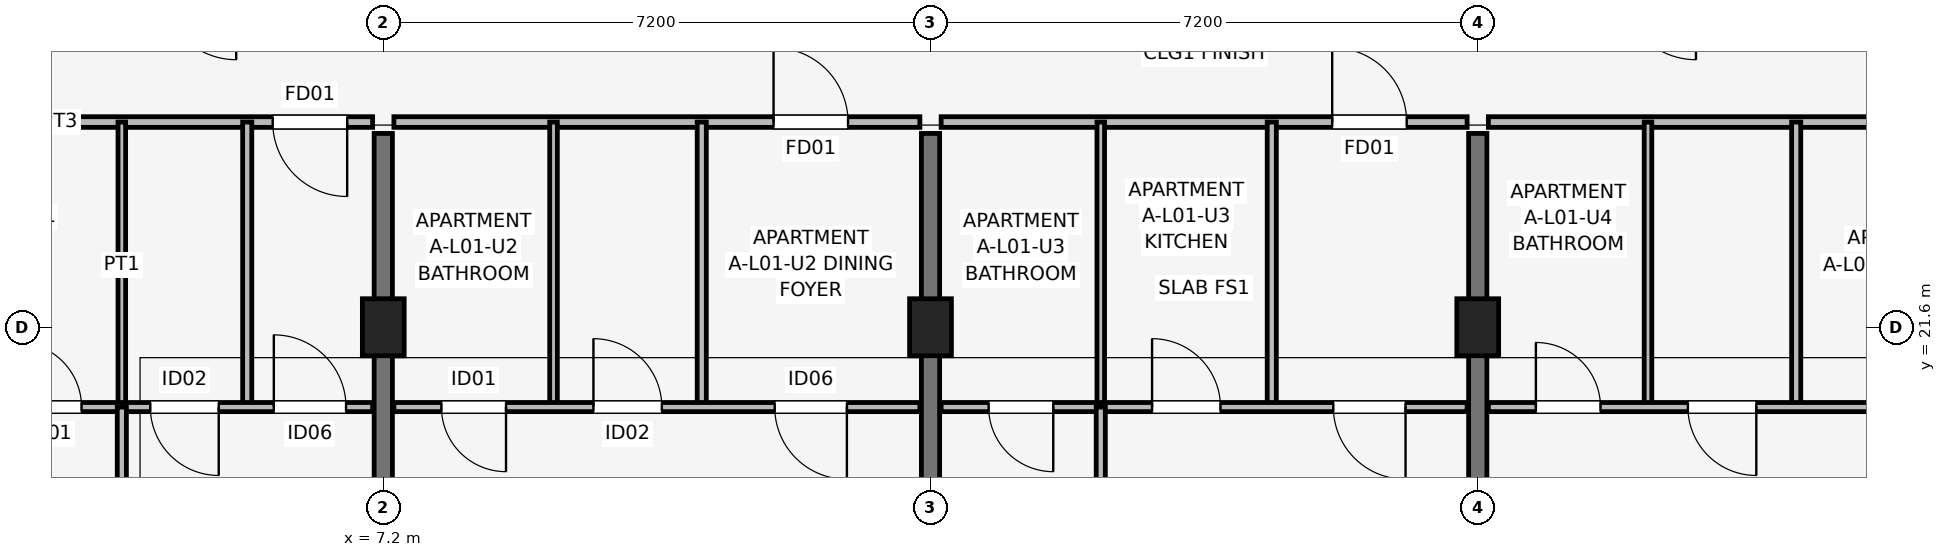
"""IFC4 building model, lengths in metres.
Left out: names, types, materials, properties, quantities, classifications, styles, units other than length and angle.
Written with IfcOpenShell. Run it as: python <this file> out.ifc"""

import sys

from ifc_helpers import new_model, si_unit, direction, frame, frame_2d, origin, origin_2d, place, context, subcontext, project, spatial, rectangle, extrude, element, fill, save


model = new_model("IFC4")
c1 = context("Model", 3, precision=1e-05, world=origin(), true_north=direction((0.0, 1.0)))
c2 = subcontext(c1, "Body", "Model", "MODEL_VIEW")
j1 = project(units=[si_unit("LENGTHUNIT", "METRE"), si_unit("PLANEANGLEUNIT", "RADIAN")], contexts=[c1])
p1 = place(None, origin())
s1 = spatial("IfcSite", under=j1, at=p1, CompositionType="ELEMENT")
p2 = place(p1, origin())
s2 = spatial("IfcBuilding", under=s1, at=p2, CompositionType="ELEMENT")
p3 = place(p2, frame((0.0, 0.0, 4.5)))
s3 = spatial("IfcBuildingStorey", under=s2, at=p3, CompositionType="ELEMENT", Elevation=4.5)
for number, where, z_axis, x_axis in (
    (1, (7.2, 21.6, 0.0), (0.0, 0.0, 1.0), (1.0, 0.0, 0.0)),
    (2, (14.4, 21.6, 0.0), (0.0, 0.0, 1.0), (1.0, 0.0, 0.0)),
    (3, (21.6, 21.6, 0.0), (0.0, 0.0, 1.0), (1.0, 0.0, 0.0)),
):
    element("IfcColumn", number, at=place(p3, frame(where, z_axis=z_axis, x_axis=x_axis)), inside=s3, PredefinedType="COLUMN", context=c2, shape_type="SweptSolid", body=[
        extrude(rectangle(XDim=0.55, YDim=0.75, at=origin_2d()), origin(), (0.0, 0.0, 1.0), 4.2),
    ])
for number, where, z_axis, x_axis in (
    (4, (7.2, 14.75, 0.0), (0.0, 0.0, 1.0), (0.0, 1.0, 0.0)),
    (5, (14.4, 14.75, 0.0), (0.0, 0.0, 1.0), (0.0, 1.0, 0.0)),
    (6, (21.6, 14.75, 0.0), (0.0, 0.0, 1.0), (0.0, 1.0, 0.0)),
):
    element("IfcWall", number, at=place(p3, frame(where, z_axis=z_axis, x_axis=x_axis)), inside=s3, PredefinedType="SHEAR", context=c2, shape_type="SweptSolid", body=[
        extrude(rectangle(XDim=9.4, YDim=0.24, at=frame_2d((4.7, 0.0))), origin(), (0.0, 0.0, 1.0), 4.2),
    ])
p4 = place(p3, frame((0.14, 24.3, 0.0), z_axis=(0.0, 0.0, 1.0), x_axis=(1.0, 0.0, 0.0)))
e7 = element("IfcWall", 7, at=p4, inside=s3, PredefinedType="PARTITIONING", context=c2, shape_type="SweptSolid", body=[
    extrude(rectangle(XDim=6.92, YDim=0.14, at=frame_2d((3.46, 0.0))), origin(), (0.0, 0.0, 1.0), 3.25),
])
p5 = place(p4, frame((6.585, 0.0, 0.0), z_axis=(0.0, 0.0, 1.0), x_axis=(-1.0, 0.0, 0.0)))
e8 = element("IfcOpeningElement", 8, at=p5, cuts=e7, PredefinedType="OPENING", context=c2, shape_type="SweptSolid", body=[
    extrude(rectangle(XDim=0.98, YDim=2.1, at=frame_2d((0.49, 1.05))), frame((0.0, 0.08, 0.0), z_axis=(0.0, -1.0, 0.0), x_axis=(1.0, 0.0, 0.0)), (0.0, 0.0, 1.0), 0.16),
])
p6 = place(p3, frame((3.76, 20.55, 0.0), z_axis=(0.0, 0.0, 1.0), x_axis=(0.0, 1.0, 0.0)))
e9 = element("IfcWall", 9, at=p6, inside=s3, PredefinedType="PARTITIONING", context=c2, shape_type="SweptSolid", body=[
    extrude(rectangle(XDim=3.75, YDim=0.1, at=frame_2d((1.875, 0.0))), origin(), (0.0, 0.0, 1.0), 3.25),
])
p7 = place(p3, frame((5.41, 20.55, 0.0), z_axis=(0.0, 0.0, 1.0), x_axis=(0.0, 1.0, 0.0)))
e10 = element("IfcWall", 10, at=p7, inside=s3, PredefinedType="PARTITIONING", context=c2, shape_type="SweptSolid", body=[
    extrude(rectangle(XDim=3.75, YDim=0.12, at=frame_2d((1.875, 0.0))), origin(), (0.0, 0.0, 1.0), 3.25),
])
p8 = place(p3, frame((0.14, 20.55, 0.0), z_axis=(0.0, 0.0, 1.0), x_axis=(1.0, 0.0, 0.0)))
e11 = element("IfcWall", 11, at=p8, inside=s3, PredefinedType="PARTITIONING", context=c2, shape_type="SweptSolid", body=[
    extrude(rectangle(XDim=6.92, YDim=0.12, at=frame_2d((3.46, 0.0))), origin(), (0.0, 0.0, 1.0), 3.25),
])
p9 = place(p8, frame((2.24, 0.0, 0.0)))
e12 = element("IfcOpeningElement", 12, at=p9, cuts=e11, PredefinedType="OPENING", context=c2, shape_type="SweptSolid", body=[
    extrude(rectangle(XDim=0.85, YDim=2.08, at=frame_2d((0.425, 1.04))), frame((0.0, 0.07, 0.0), z_axis=(0.0, -1.0, 0.0), x_axis=(1.0, 0.0, 0.0)), (0.0, 0.0, 1.0), 0.14),
])
p10 = place(p8, frame((4.895, 0.0, 0.0), z_axis=(0.0, 0.0, 1.0), x_axis=(-1.0, 0.0, 0.0)))
e13 = element("IfcOpeningElement", 13, at=p10, cuts=e11, PredefinedType="OPENING", context=c2, shape_type="SweptSolid", body=[
    extrude(rectangle(XDim=0.9, YDim=2.08, at=frame_2d((0.45, 1.04))), frame((0.0, 0.07, 0.0), z_axis=(0.0, -1.0, 0.0), x_axis=(1.0, 0.0, 0.0)), (0.0, 0.0, 1.0), 0.14),
])
p11 = place(p8, frame((5.62, 0.0, 0.0)))
e14 = element("IfcOpeningElement", 14, at=p11, cuts=e11, PredefinedType="OPENING", context=c2, shape_type="SweptSolid", body=[
    extrude(rectangle(XDim=0.95, YDim=2.08, at=frame_2d((0.475, 1.04))), frame((0.0, 0.07, 0.0), z_axis=(0.0, -1.0, 0.0), x_axis=(1.0, 0.0, 0.0)), (0.0, 0.0, 1.0), 0.14),
])
p12 = place(p3, frame((3.76, 14.7, 0.0), z_axis=(0.0, 0.0, 1.0), x_axis=(0.0, 1.0, 0.0)))
e15 = element("IfcWall", 15, at=p12, inside=s3, PredefinedType="PARTITIONING", context=c2, shape_type="SweptSolid", body=[
    extrude(rectangle(XDim=5.85, YDim=0.12, at=frame_2d((2.925, 0.0))), origin(), (0.0, 0.0, 1.0), 3.25),
])
p13 = place(p12, frame((3.375, 0.0, 0.0), z_axis=(0.0, 0.0, 1.0), x_axis=(-1.0, 0.0, 0.0)))
e16 = element("IfcOpeningElement", 16, at=p13, cuts=e15, PredefinedType="OPENING", context=c2, shape_type="SweptSolid", body=[
    extrude(rectangle(XDim=0.9, YDim=2.08, at=frame_2d((0.45, 1.04))), frame((0.0, 0.07, 0.0), z_axis=(0.0, -1.0, 0.0), x_axis=(1.0, 0.0, 0.0)), (0.0, 0.0, 1.0), 0.14),
])
p14 = place(p3, frame((7.34, 24.3, 0.0), z_axis=(0.0, 0.0, 1.0), x_axis=(1.0, 0.0, 0.0)))
e17 = element("IfcWall", 17, at=p14, inside=s3, PredefinedType="PARTITIONING", context=c2, shape_type="SweptSolid", body=[
    extrude(rectangle(XDim=6.92, YDim=0.14, at=frame_2d((3.46, 0.0))), origin(), (0.0, 0.0, 1.0), 3.25),
])
p15 = place(p14, frame((4.995, 0.0, 0.0)))
e18 = element("IfcOpeningElement", 18, at=p15, cuts=e17, PredefinedType="OPENING", context=c2, shape_type="SweptSolid", body=[
    extrude(rectangle(XDim=0.98, YDim=2.1, at=frame_2d((0.49, 1.05))), frame((0.0, 0.08, 0.0), z_axis=(0.0, -1.0, 0.0), x_axis=(1.0, 0.0, 0.0)), (0.0, 0.0, 1.0), 0.16),
])
p16 = place(p3, frame((9.44, 20.55, 0.0), z_axis=(0.0, 0.0, 1.0), x_axis=(0.0, 1.0, 0.0)))
e19 = element("IfcWall", 19, at=p16, inside=s3, PredefinedType="PARTITIONING", context=c2, shape_type="SweptSolid", body=[
    extrude(rectangle(XDim=3.75, YDim=0.1, at=frame_2d((1.875, 0.0))), origin(), (0.0, 0.0, 1.0), 3.25),
])
p17 = place(p3, frame((11.39, 20.55, 0.0), z_axis=(0.0, 0.0, 1.0), x_axis=(0.0, 1.0, 0.0)))
e20 = element("IfcWall", 20, at=p17, inside=s3, PredefinedType="PARTITIONING", context=c2, shape_type="SweptSolid", body=[
    extrude(rectangle(XDim=3.75, YDim=0.12, at=frame_2d((1.875, 0.0))), origin(), (0.0, 0.0, 1.0), 3.25),
])
p18 = place(p3, frame((7.34, 20.55, 0.0), z_axis=(0.0, 0.0, 1.0), x_axis=(1.0, 0.0, 0.0)))
e21 = element("IfcWall", 21, at=p18, inside=s3, PredefinedType="PARTITIONING", context=c2, shape_type="SweptSolid", body=[
    extrude(rectangle(XDim=6.92, YDim=0.12, at=frame_2d((3.46, 0.0))), origin(), (0.0, 0.0, 1.0), 3.25),
])
p19 = place(p18, frame((1.475, 0.0, 0.0), z_axis=(0.0, 0.0, 1.0), x_axis=(-1.0, 0.0, 0.0)))
e22 = element("IfcOpeningElement", 22, at=p19, cuts=e21, PredefinedType="OPENING", context=c2, shape_type="SweptSolid", body=[
    extrude(rectangle(XDim=0.85, YDim=2.08, at=frame_2d((0.425, 1.04))), frame((0.0, 0.07, 0.0), z_axis=(0.0, -1.0, 0.0), x_axis=(1.0, 0.0, 0.0)), (0.0, 0.0, 1.0), 0.14),
])
p20 = place(p18, frame((2.625, 0.0, 0.0)))
e23 = element("IfcOpeningElement", 23, at=p20, cuts=e21, PredefinedType="OPENING", context=c2, shape_type="SweptSolid", body=[
    extrude(rectangle(XDim=0.9, YDim=2.08, at=frame_2d((0.45, 1.04))), frame((0.0, 0.07, 0.0), z_axis=(0.0, -1.0, 0.0), x_axis=(1.0, 0.0, 0.0)), (0.0, 0.0, 1.0), 0.14),
])
p21 = place(p18, frame((5.96, 0.0, 0.0), z_axis=(0.0, 0.0, 1.0), x_axis=(-1.0, 0.0, 0.0)))
e24 = element("IfcOpeningElement", 24, at=p21, cuts=e21, PredefinedType="OPENING", context=c2, shape_type="SweptSolid", body=[
    extrude(rectangle(XDim=0.95, YDim=2.08, at=frame_2d((0.475, 1.04))), frame((0.0, 0.07, 0.0), z_axis=(0.0, -1.0, 0.0), x_axis=(1.0, 0.0, 0.0)), (0.0, 0.0, 1.0), 0.14),
])
p22 = place(p3, frame((14.54, 24.3, 0.0), z_axis=(0.0, 0.0, 1.0), x_axis=(1.0, 0.0, 0.0)))
e25 = element("IfcWall", 25, at=p22, inside=s3, PredefinedType="PARTITIONING", context=c2, shape_type="SweptSolid", body=[
    extrude(rectangle(XDim=6.92, YDim=0.14, at=frame_2d((3.46, 0.0))), origin(), (0.0, 0.0, 1.0), 3.25),
])
p23 = place(p22, frame((5.145, 0.0, 0.0)))
e26 = element("IfcOpeningElement", 26, at=p23, cuts=e25, PredefinedType="OPENING", context=c2, shape_type="SweptSolid", body=[
    extrude(rectangle(XDim=0.98, YDim=2.1, at=frame_2d((0.49, 1.05))), frame((0.0, 0.08, 0.0), z_axis=(0.0, -1.0, 0.0), x_axis=(1.0, 0.0, 0.0)), (0.0, 0.0, 1.0), 0.16),
])
p24 = place(p3, frame((16.64, 20.55, 0.0), z_axis=(0.0, 0.0, 1.0), x_axis=(0.0, 1.0, 0.0)))
e27 = element("IfcWall", 27, at=p24, inside=s3, PredefinedType="PARTITIONING", context=c2, shape_type="SweptSolid", body=[
    extrude(rectangle(XDim=3.75, YDim=0.1, at=frame_2d((1.875, 0.0))), origin(), (0.0, 0.0, 1.0), 3.25),
])
p25 = place(p3, frame((18.89, 20.55, 0.0), z_axis=(0.0, 0.0, 1.0), x_axis=(0.0, 1.0, 0.0)))
e28 = element("IfcWall", 28, at=p25, inside=s3, PredefinedType="PARTITIONING", context=c2, shape_type="SweptSolid", body=[
    extrude(rectangle(XDim=3.75, YDim=0.12, at=frame_2d((1.875, 0.0))), origin(), (0.0, 0.0, 1.0), 3.25),
])
p26 = place(p3, frame((14.54, 20.55, 0.0), z_axis=(0.0, 0.0, 1.0), x_axis=(1.0, 0.0, 0.0)))
e29 = element("IfcWall", 29, at=p26, inside=s3, PredefinedType="PARTITIONING", context=c2, shape_type="SweptSolid", body=[
    extrude(rectangle(XDim=6.92, YDim=0.12, at=frame_2d((3.46, 0.0))), origin(), (0.0, 0.0, 1.0), 3.25),
])
p27 = place(p26, frame((1.475, 0.0, 0.0), z_axis=(0.0, 0.0, 1.0), x_axis=(-1.0, 0.0, 0.0)))
e30 = element("IfcOpeningElement", 30, at=p27, cuts=e29, PredefinedType="OPENING", context=c2, shape_type="SweptSolid", body=[
    extrude(rectangle(XDim=0.85, YDim=2.08, at=frame_2d((0.425, 1.04))), frame((0.0, 0.07, 0.0), z_axis=(0.0, -1.0, 0.0), x_axis=(1.0, 0.0, 0.0)), (0.0, 0.0, 1.0), 0.14),
])
p28 = place(p26, frame((2.775, 0.0, 0.0)))
e31 = element("IfcOpeningElement", 31, at=p28, cuts=e29, PredefinedType="OPENING", context=c2, shape_type="SweptSolid", body=[
    extrude(rectangle(XDim=0.9, YDim=2.08, at=frame_2d((0.45, 1.04))), frame((0.0, 0.07, 0.0), z_axis=(0.0, -1.0, 0.0), x_axis=(1.0, 0.0, 0.0)), (0.0, 0.0, 1.0), 0.14),
])
p29 = place(p26, frame((6.11, 0.0, 0.0), z_axis=(0.0, 0.0, 1.0), x_axis=(-1.0, 0.0, 0.0)))
e32 = element("IfcOpeningElement", 32, at=p29, cuts=e29, PredefinedType="OPENING", context=c2, shape_type="SweptSolid", body=[
    extrude(rectangle(XDim=0.95, YDim=2.08, at=frame_2d((0.475, 1.04))), frame((0.0, 0.07, 0.0), z_axis=(0.0, -1.0, 0.0), x_axis=(1.0, 0.0, 0.0)), (0.0, 0.0, 1.0), 0.14),
])
p30 = place(p3, frame((16.64, 14.7, 0.0), z_axis=(0.0, 0.0, 1.0), x_axis=(0.0, 1.0, 0.0)))
e33 = element("IfcWall", 33, at=p30, inside=s3, PredefinedType="PARTITIONING", context=c2, shape_type="SweptSolid", body=[
    extrude(rectangle(XDim=5.85, YDim=0.12, at=frame_2d((2.925, 0.0))), origin(), (0.0, 0.0, 1.0), 3.25),
])
p31 = place(p30, frame((2.475, 0.0, 0.0)))
e34 = element("IfcOpeningElement", 34, at=p31, cuts=e33, PredefinedType="OPENING", context=c2, shape_type="SweptSolid", body=[
    extrude(rectangle(XDim=0.9, YDim=2.08, at=frame_2d((0.45, 1.04))), frame((0.0, 0.07, 0.0), z_axis=(0.0, -1.0, 0.0), x_axis=(1.0, 0.0, 0.0)), (0.0, 0.0, 1.0), 0.14),
])
p32 = place(p3, frame((21.74, 24.3, 0.0), z_axis=(0.0, 0.0, 1.0), x_axis=(1.0, 0.0, 0.0)))
e35 = element("IfcWall", 35, at=p32, inside=s3, PredefinedType="PARTITIONING", context=c2, shape_type="SweptSolid", body=[
    extrude(rectangle(XDim=6.92, YDim=0.14, at=frame_2d((3.46, 0.0))), origin(), (0.0, 0.0, 1.0), 3.25),
])
p33 = place(p32, frame((5.975, 0.0, 0.0), z_axis=(0.0, 0.0, 1.0), x_axis=(-1.0, 0.0, 0.0)))
e36 = element("IfcOpeningElement", 36, at=p33, cuts=e35, PredefinedType="OPENING", context=c2, shape_type="SweptSolid", body=[
    extrude(rectangle(XDim=0.98, YDim=2.1, at=frame_2d((0.49, 1.05))), frame((0.0, 0.08, 0.0), z_axis=(0.0, -1.0, 0.0), x_axis=(1.0, 0.0, 0.0)), (0.0, 0.0, 1.0), 0.16),
])
p34 = place(p3, frame((23.84, 20.55, 0.0), z_axis=(0.0, 0.0, 1.0), x_axis=(0.0, 1.0, 0.0)))
e37 = element("IfcWall", 37, at=p34, inside=s3, PredefinedType="PARTITIONING", context=c2, shape_type="SweptSolid", body=[
    extrude(rectangle(XDim=3.75, YDim=0.1, at=frame_2d((1.875, 0.0))), origin(), (0.0, 0.0, 1.0), 3.25),
])
p35 = place(p3, frame((25.79, 20.55, 0.0), z_axis=(0.0, 0.0, 1.0), x_axis=(0.0, 1.0, 0.0)))
e38 = element("IfcWall", 38, at=p35, inside=s3, PredefinedType="PARTITIONING", context=c2, shape_type="SweptSolid", body=[
    extrude(rectangle(XDim=3.75, YDim=0.12, at=frame_2d((1.875, 0.0))), origin(), (0.0, 0.0, 1.0), 3.25),
])
p36 = place(p3, frame((21.74, 20.55, 0.0), z_axis=(0.0, 0.0, 1.0), x_axis=(1.0, 0.0, 0.0)))
e39 = element("IfcWall", 39, at=p36, inside=s3, PredefinedType="PARTITIONING", context=c2, shape_type="SweptSolid", body=[
    extrude(rectangle(XDim=6.92, YDim=0.12, at=frame_2d((3.46, 0.0))), origin(), (0.0, 0.0, 1.0), 3.25),
])
p37 = place(p36, frame((0.625, 0.0, 0.0)))
e40 = element("IfcOpeningElement", 40, at=p37, cuts=e39, PredefinedType="OPENING", context=c2, shape_type="SweptSolid", body=[
    extrude(rectangle(XDim=0.85, YDim=2.08, at=frame_2d((0.425, 1.04))), frame((0.0, 0.07, 0.0), z_axis=(0.0, -1.0, 0.0), x_axis=(1.0, 0.0, 0.0)), (0.0, 0.0, 1.0), 0.14),
])
p38 = place(p36, frame((3.525, 0.0, 0.0), z_axis=(0.0, 0.0, 1.0), x_axis=(-1.0, 0.0, 0.0)))
e41 = element("IfcOpeningElement", 41, at=p38, cuts=e39, PredefinedType="OPENING", context=c2, shape_type="SweptSolid", body=[
    extrude(rectangle(XDim=0.9, YDim=2.08, at=frame_2d((0.45, 1.04))), frame((0.0, 0.07, 0.0), z_axis=(0.0, -1.0, 0.0), x_axis=(1.0, 0.0, 0.0)), (0.0, 0.0, 1.0), 0.14),
])
p39 = place(p36, frame((5.01, 0.0, 0.0)))
e42 = element("IfcOpeningElement", 42, at=p39, cuts=e39, PredefinedType="OPENING", context=c2, shape_type="SweptSolid", body=[
    extrude(rectangle(XDim=0.95, YDim=2.08, at=frame_2d((0.475, 1.04))), frame((0.0, 0.07, 0.0), z_axis=(0.0, -1.0, 0.0), x_axis=(1.0, 0.0, 0.0)), (0.0, 0.0, 1.0), 0.14),
])
p40 = place(p5, origin())
e43 = element("IfcDoor", 43, at=p40, inside=s3, OperationType="SINGLE_SWING_RIGHT", PredefinedType="DOOR", context=c2, shape_type="SweptSolid", body=[
    extrude(rectangle(XDim=0.98, YDim=2.1, at=frame_2d((0.49, 1.05))), frame((0.0, 0.025, 0.0), z_axis=(0.0, -1.0, 0.0), x_axis=(1.0, 0.0, 0.0)), (0.0, 0.0, 1.0), 0.05),
])
fill(e8, e43)
p41 = place(p9, origin())
e44 = element("IfcDoor", 44, at=p41, inside=s3, OperationType="SINGLE_SWING_LEFT", PredefinedType="DOOR", context=c2, shape_type="SweptSolid", body=[
    extrude(rectangle(XDim=0.85, YDim=2.08, at=frame_2d((0.425, 1.04))), frame((0.0, 0.025, 0.0), z_axis=(0.0, -1.0, 0.0), x_axis=(1.0, 0.0, 0.0)), (0.0, 0.0, 1.0), 0.05),
])
fill(e12, e44)
p42 = place(p10, origin())
e45 = element("IfcDoor", 45, at=p42, inside=s3, OperationType="SINGLE_SWING_RIGHT", PredefinedType="DOOR", context=c2, shape_type="SweptSolid", body=[
    extrude(rectangle(XDim=0.9, YDim=2.08, at=frame_2d((0.45, 1.04))), frame((0.0, 0.025, 0.0), z_axis=(0.0, -1.0, 0.0), x_axis=(1.0, 0.0, 0.0)), (0.0, 0.0, 1.0), 0.05),
])
fill(e13, e45)
p43 = place(p11, origin())
e46 = element("IfcDoor", 46, at=p43, inside=s3, OperationType="SINGLE_SWING_LEFT", PredefinedType="DOOR", context=c2, shape_type="SweptSolid", body=[
    extrude(rectangle(XDim=0.95, YDim=2.08, at=frame_2d((0.475, 1.04))), frame((0.0, 0.025, 0.0), z_axis=(0.0, -1.0, 0.0), x_axis=(1.0, 0.0, 0.0)), (0.0, 0.0, 1.0), 0.05),
])
fill(e14, e46)
p44 = place(p15, origin())
e47 = element("IfcDoor", 47, at=p44, inside=s3, OperationType="SINGLE_SWING_LEFT", PredefinedType="DOOR", context=c2, shape_type="SweptSolid", body=[
    extrude(rectangle(XDim=0.98, YDim=2.1, at=frame_2d((0.49, 1.05))), frame((0.0, 0.025, 0.0), z_axis=(0.0, -1.0, 0.0), x_axis=(1.0, 0.0, 0.0)), (0.0, 0.0, 1.0), 0.05),
])
fill(e18, e47)
p45 = place(p19, origin())
e48 = element("IfcDoor", 48, at=p45, inside=s3, OperationType="SINGLE_SWING_RIGHT", PredefinedType="DOOR", context=c2, shape_type="SweptSolid", body=[
    extrude(rectangle(XDim=0.85, YDim=2.08, at=frame_2d((0.425, 1.04))), frame((0.0, 0.025, 0.0), z_axis=(0.0, -1.0, 0.0), x_axis=(1.0, 0.0, 0.0)), (0.0, 0.0, 1.0), 0.05),
])
fill(e22, e48)
p46 = place(p20, origin())
e49 = element("IfcDoor", 49, at=p46, inside=s3, OperationType="SINGLE_SWING_LEFT", PredefinedType="DOOR", context=c2, shape_type="SweptSolid", body=[
    extrude(rectangle(XDim=0.9, YDim=2.08, at=frame_2d((0.45, 1.04))), frame((0.0, 0.025, 0.0), z_axis=(0.0, -1.0, 0.0), x_axis=(1.0, 0.0, 0.0)), (0.0, 0.0, 1.0), 0.05),
])
fill(e23, e49)
p47 = place(p21, origin())
e50 = element("IfcDoor", 50, at=p47, inside=s3, OperationType="SINGLE_SWING_RIGHT", PredefinedType="DOOR", context=c2, shape_type="SweptSolid", body=[
    extrude(rectangle(XDim=0.95, YDim=2.08, at=frame_2d((0.475, 1.04))), frame((0.0, 0.025, 0.0), z_axis=(0.0, -1.0, 0.0), x_axis=(1.0, 0.0, 0.0)), (0.0, 0.0, 1.0), 0.05),
])
fill(e24, e50)
p48 = place(p23, origin())
e51 = element("IfcDoor", 51, at=p48, inside=s3, OperationType="SINGLE_SWING_LEFT", PredefinedType="DOOR", context=c2, shape_type="SweptSolid", body=[
    extrude(rectangle(XDim=0.98, YDim=2.1, at=frame_2d((0.49, 1.05))), frame((0.0, 0.025, 0.0), z_axis=(0.0, -1.0, 0.0), x_axis=(1.0, 0.0, 0.0)), (0.0, 0.0, 1.0), 0.05),
])
fill(e26, e51)
p49 = place(p27, origin())
e52 = element("IfcDoor", 52, at=p49, inside=s3, OperationType="SINGLE_SWING_RIGHT", PredefinedType="DOOR", context=c2, shape_type="SweptSolid", body=[
    extrude(rectangle(XDim=0.85, YDim=2.08, at=frame_2d((0.425, 1.04))), frame((0.0, 0.025, 0.0), z_axis=(0.0, -1.0, 0.0), x_axis=(1.0, 0.0, 0.0)), (0.0, 0.0, 1.0), 0.05),
])
fill(e30, e52)
p50 = place(p28, origin())
e53 = element("IfcDoor", 53, at=p50, inside=s3, OperationType="SINGLE_SWING_LEFT", PredefinedType="DOOR", context=c2, shape_type="SweptSolid", body=[
    extrude(rectangle(XDim=0.9, YDim=2.08, at=frame_2d((0.45, 1.04))), frame((0.0, 0.025, 0.0), z_axis=(0.0, -1.0, 0.0), x_axis=(1.0, 0.0, 0.0)), (0.0, 0.0, 1.0), 0.05),
])
fill(e31, e53)
p51 = place(p29, origin())
e54 = element("IfcDoor", 54, at=p51, inside=s3, OperationType="SINGLE_SWING_RIGHT", PredefinedType="DOOR", context=c2, shape_type="SweptSolid", body=[
    extrude(rectangle(XDim=0.95, YDim=2.08, at=frame_2d((0.475, 1.04))), frame((0.0, 0.025, 0.0), z_axis=(0.0, -1.0, 0.0), x_axis=(1.0, 0.0, 0.0)), (0.0, 0.0, 1.0), 0.05),
])
fill(e32, e54)
p52 = place(p37, origin())
e55 = element("IfcDoor", 55, at=p52, inside=s3, OperationType="SINGLE_SWING_LEFT", PredefinedType="DOOR", context=c2, shape_type="SweptSolid", body=[
    extrude(rectangle(XDim=0.85, YDim=2.08, at=frame_2d((0.425, 1.04))), frame((0.0, 0.025, 0.0), z_axis=(0.0, -1.0, 0.0), x_axis=(1.0, 0.0, 0.0)), (0.0, 0.0, 1.0), 0.05),
])
fill(e40, e55)
p53 = place(p38, origin())
e56 = element("IfcDoor", 56, at=p53, inside=s3, OperationType="SINGLE_SWING_RIGHT", PredefinedType="DOOR", context=c2, shape_type="SweptSolid", body=[
    extrude(rectangle(XDim=0.9, YDim=2.08, at=frame_2d((0.45, 1.04))), frame((0.0, 0.025, 0.0), z_axis=(0.0, -1.0, 0.0), x_axis=(1.0, 0.0, 0.0)), (0.0, 0.0, 1.0), 0.05),
])
fill(e41, e56)
save(model, sys.argv[1])
